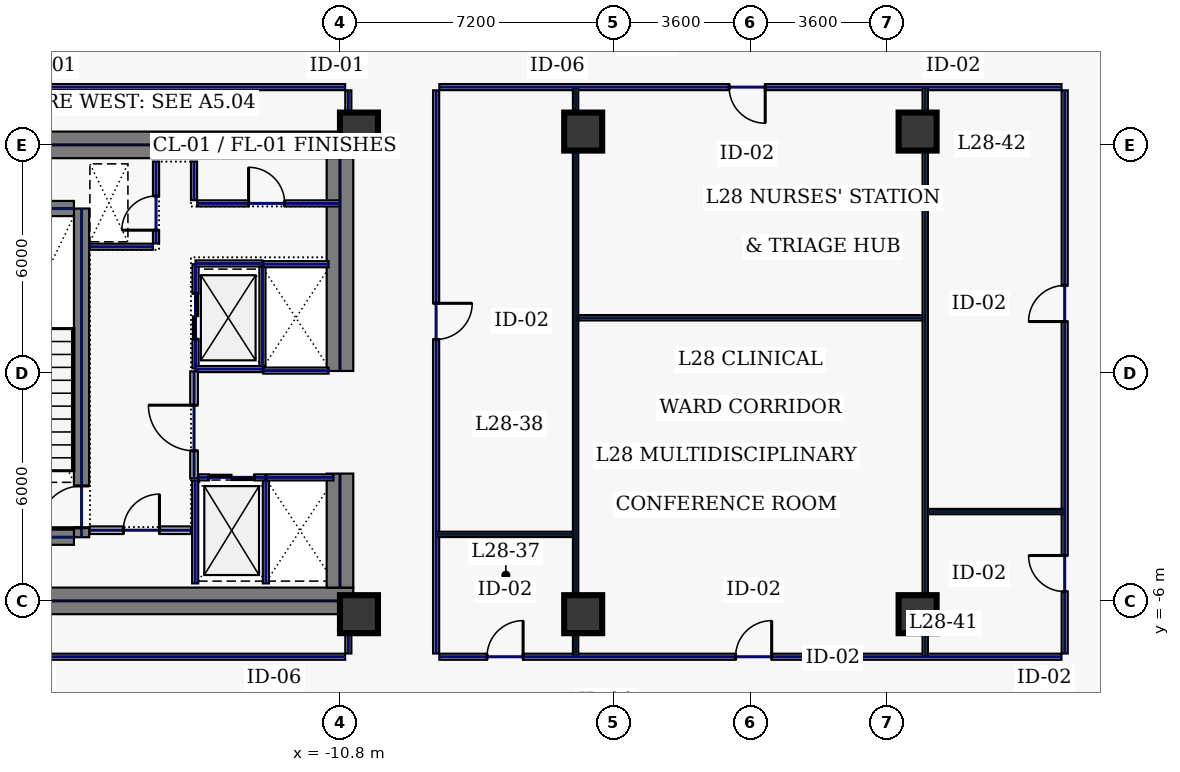
"""IFC4 building model, lengths in metres.
Left out: names, types, materials, properties, quantities, classifications, styles, units other than length and angle.
Written with IfcOpenShell. Run it as: python <this file> out.ifc"""

import sys

from ifc_helpers import new_model, si_unit, direction, frame, frame_2d, origin, origin_2d, place, context, subcontext, project, spatial, rectangle, hollow_rectangle, extrude, element, fill, save


model = new_model("IFC4")
c1 = context("Model", 3, precision=1e-05, world=origin(), true_north=direction((0.0, 1.0)))
c2 = subcontext(c1, "Body", "Model", "MODEL_VIEW")
j1 = project(units=[si_unit("LENGTHUNIT", "METRE"), si_unit("PLANEANGLEUNIT", "RADIAN")], contexts=[c1])
p1 = place(None, origin())
s1 = spatial("IfcSite", under=j1, at=p1, CompositionType="ELEMENT")
p2 = place(p1, origin())
s2 = spatial("IfcBuilding", under=s1, at=p2, CompositionType="ELEMENT")
p3 = place(p2, frame((0.0, 0.0, 125.4)))
s3 = spatial("IfcBuildingStorey", under=s2, at=p3, CompositionType="ELEMENT", Elevation=125.4)
for number, where, z_axis, x_axis in (
    (1, (-22.0, 6.0, 0.0), (0.0, 0.0, 1.0), (1.0, 0.0, 0.0)),
    (2, (-22.0, -6.0, 0.0), (0.0, 0.0, 1.0), (1.0, 0.0, 0.0)),
):
    element("IfcWall", number, at=place(p3, frame(where, z_axis=z_axis, x_axis=x_axis)), inside=s3, PredefinedType="SHEAR", context=c2, shape_type="SweptSolid", body=[
        extrude(rectangle(XDim=11.55, YDim=0.7, at=frame_2d((5.775, 0.0))), origin(), (0.0, 0.0, 1.0), 3.74),
    ])
p4 = place(p3, frame((-10.8, -5.65, 0.0), z_axis=(0.0, 0.0, 1.0), x_axis=(0.0, 1.0, 0.0)))
e3 = element("IfcWall", 3, at=p4, inside=s3, PredefinedType="SHEAR", context=c2, shape_type="SweptSolid", body=[
    extrude(rectangle(XDim=3.0, YDim=0.7, at=frame_2d((1.5, 0.0))), origin(), (0.0, 0.0, 1.0), 3.74),
])
p5 = place(p3, frame((-10.8, 0.05, 0.0), z_axis=(0.0, 0.0, 1.0), x_axis=(0.0, 1.0, 0.0)))
e4 = element("IfcWall", 4, at=p5, inside=s3, PredefinedType="SHEAR", context=c2, shape_type="SweptSolid", body=[
    extrude(rectangle(XDim=5.6, YDim=0.7, at=frame_2d((2.8, 0.0))), origin(), (0.0, 0.0, 1.0), 3.74),
])
p6 = place(p3, frame((-17.6, -4.325, 0.0), z_axis=(0.0, 0.0, 1.0), x_axis=(0.0, 1.0, 0.0)))
e5 = element("IfcWall", 5, at=p6, inside=s3, PredefinedType="SHEAR", context=c2, shape_type="SweptSolid", body=[
    extrude(rectangle(XDim=8.65, YDim=0.4, at=frame_2d((4.325, 0.0))), origin(), (0.0, 0.0, 1.0), 3.74),
])
p7 = place(p6, frame((0.25, 0.0, 0.0)))
e6 = element("IfcOpeningElement", 6, at=p7, cuts=e5, PredefinedType="OPENING", context=c2, shape_type="SweptSolid", body=[
    extrude(rectangle(XDim=1.1, YDim=2.2, at=frame_2d((0.55, 1.1))), frame((0.0, 0.21, 0.0), z_axis=(0.0, -1.0, 0.0), x_axis=(1.0, 0.0, 0.0)), (0.0, 0.0, 1.0), 0.42),
])
for number, where, z_axis, x_axis in (
    (7, (-21.2, -4.325, 0.0), (0.0, 0.0, 1.0), (1.0, 0.0, 0.0)),
    (8, (-21.2, 4.325, 0.0), (0.0, 0.0, 1.0), (1.0, 0.0, 0.0)),
):
    element("IfcWall", number, at=place(p3, frame(where, z_axis=z_axis, x_axis=x_axis)), inside=s3, PredefinedType="SHEAR", context=c2, shape_type="SweptSolid", body=[
        extrude(rectangle(XDim=3.4, YDim=0.4, at=frame_2d((1.7, 0.0))), origin(), (0.0, 0.0, 1.0), 3.74),
    ])
for number, where, z_axis, x_axis in (
    (9, (-10.3, -6.35, 0.0), (0.0, 0.0, 1.0), (1.0, 0.0, 0.0)),
    (10, (-10.3, 6.35, 0.0), (0.0, 0.0, 1.0), (1.0, 0.0, 0.0)),
    (11, (-4.4, -6.35, 0.0), (0.0, 0.0, 1.0), (1.0, 0.0, 0.0)),
    (12, (4.4, -6.35, 0.0), (0.0, 0.0, 1.0), (1.0, 0.0, 0.0)),
    (13, (-4.4, 6.35, 0.0), (0.0, 0.0, 1.0), (1.0, 0.0, 0.0)),
    (14, (4.4, 6.35, 0.0), (0.0, 0.0, 1.0), (1.0, 0.0, 0.0)),
):
    element("IfcColumn", number, at=place(p3, frame(where, z_axis=z_axis, x_axis=x_axis)), inside=s3, PredefinedType="COLUMN", context=c2, shape_type="SweptSolid", body=[
        extrude(hollow_rectangle(XDim=1.0, YDim=1.0, WallThickness=0.045, at=origin_2d()), origin(), (0.0, 0.0, 1.0), 3.74),
    ])
p8 = place(p3, frame((-14.6, 0.12, 0.0), z_axis=(0.0, 0.0, 1.0), x_axis=(0.0, 1.0, 0.0)))
e15 = element("IfcWall", 15, at=p8, inside=s3, PredefinedType="PARTITIONING", context=c2, shape_type="SweptSolid", body=[
    extrude(rectangle(XDim=2.74, YDim=0.16, at=frame_2d((1.37, 0.0))), origin(), (0.0, 0.0, 1.0), 3.74),
])
p9 = place(p8, frame((0.77, 0.0, 0.0)))
e16 = element("IfcOpeningElement", 16, at=p9, cuts=e15, PredefinedType="OPENING", context=c2, shape_type="SweptSolid", body=[
    extrude(rectangle(XDim=1.2, YDim=2.2, at=frame_2d((0.6, 1.1))), frame((0.0, 0.09, 0.0), z_axis=(0.0, -1.0, 0.0), x_axis=(1.0, 0.0, 0.0)), (0.0, 0.0, 1.0), 0.18),
])
for number, where, z_axis, x_axis in (
    (17, (-14.6, 0.1, 0.0), (0.0, 0.0, 1.0), (1.0, 0.0, 0.0)),
    (18, (-14.6, 2.88, 0.0), (0.0, 0.0, 1.0), (1.0, 0.0, 0.0)),
):
    element("IfcWall", number, at=place(p3, frame(where, z_axis=z_axis, x_axis=x_axis)), inside=s3, PredefinedType="PARTITIONING", context=c2, shape_type="SweptSolid", body=[
        extrude(rectangle(XDim=1.76, YDim=0.16, at=frame_2d((0.88, 0.0))), origin(), (0.0, 0.0, 1.0), 3.74),
    ])
p10 = place(p3, frame((-12.84, 0.18, 0.0), z_axis=(0.0, 0.0, 1.0), x_axis=(0.0, 1.0, 0.0)))
e19 = element("IfcWall", 19, at=p10, inside=s3, PredefinedType="PARTITIONING", context=c2, shape_type="SweptSolid", body=[
    extrude(rectangle(XDim=2.62, YDim=0.16, at=frame_2d((1.31, 0.0))), origin(), (0.0, 0.0, 1.0), 3.74),
])
p11 = place(p3, frame((-14.53, -2.75, 0.0), z_axis=(0.0, 0.0, 1.0), x_axis=(1.0, 0.0, 0.0)))
e20 = element("IfcWall", 20, at=p11, inside=s3, PredefinedType="PARTITIONING", context=c2, shape_type="SweptSolid", body=[
    extrude(rectangle(XDim=1.76, YDim=0.16, at=frame_2d((0.88, 0.0))), origin(), (0.0, 0.0, 1.0), 3.74),
])
p12 = place(p11, frame((0.28, 0.0, 0.0)))
e21 = element("IfcOpeningElement", 21, at=p12, cuts=e20, PredefinedType="OPENING", context=c2, shape_type="SweptSolid", body=[
    extrude(rectangle(XDim=1.2, YDim=2.2, at=frame_2d((0.6, 1.1))), frame((0.0, 0.09, 0.0), z_axis=(0.0, -1.0, 0.0), x_axis=(1.0, 0.0, 0.0)), (0.0, 0.0, 1.0), 0.18),
])
for number, where, z_axis, x_axis in (
    (22, (-12.75, -5.54, 0.0), (0.0, 0.0, 1.0), (0.0, 1.0, 0.0)),
    (23, (-14.61, -5.54, 0.0), (0.0, 0.0, 1.0), (0.0, 1.0, 0.0)),
):
    element("IfcWall", number, at=place(p3, frame(where, z_axis=z_axis, x_axis=x_axis)), inside=s3, PredefinedType="PARTITIONING", context=c2, shape_type="SweptSolid", body=[
        extrude(rectangle(XDim=2.7, YDim=0.16, at=frame_2d((1.35, 0.0))), origin(), (0.0, 0.0, 1.0), 3.74),
    ])
p13 = place(p3, frame((-12.73, -2.75, 0.0), z_axis=(0.0, 0.0, 1.0), x_axis=(1.0, 0.0, 0.0)))
e24 = element("IfcWall", 24, at=p13, inside=s3, PredefinedType="PARTITIONING", context=c2, shape_type="SweptSolid", body=[
    extrude(rectangle(XDim=1.76, YDim=0.16, at=frame_2d((0.88, 0.0))), origin(), (0.0, 0.0, 1.0), 3.74),
])
for number, where, z_axis, x_axis in (
    (25, (-12.82, 0.06, 0.0), (0.0, 0.0, 1.0), (1.0, 0.0, 0.0)),
    (26, (-12.82, 2.86, 0.0), (0.0, 0.0, 1.0), (1.0, 0.0, 0.0)),
):
    element("IfcWall", number, at=place(p3, frame(where, z_axis=z_axis, x_axis=x_axis)), inside=s3, PredefinedType="PARTITIONING", context=c2, shape_type="SweptSolid", body=[
        extrude(rectangle(XDim=1.72, YDim=0.16, at=frame_2d((0.86, 0.0))), origin(), (0.0, 0.0, 1.0), 3.74),
    ])
p14 = place(p3, frame((-15.64, 3.405, 0.0), z_axis=(0.0, 0.0, 1.0), x_axis=(0.0, 1.0, 0.0)))
e27 = element("IfcWall", 27, at=p14, inside=s3, PredefinedType="PARTITIONING", context=c2, shape_type="SweptSolid", body=[
    extrude(rectangle(XDim=2.155, YDim=0.16, at=frame_2d((1.078, 0.0))), origin(), (0.0, 0.0, 1.0), 3.74),
])
p15 = place(p14, frame((0.35, 0.0, 0.0)))
e28 = element("IfcOpeningElement", 28, at=p15, cuts=e27, PredefinedType="OPENING", context=c2, shape_type="SweptSolid", body=[
    extrude(rectangle(XDim=0.9, YDim=2.2, at=frame_2d((0.45, 1.1))), frame((0.0, 0.09, 0.0), z_axis=(0.0, -1.0, 0.0), x_axis=(1.0, 0.0, 0.0)), (0.0, 0.0, 1.0), 0.18),
])
p16 = place(p3, frame((-17.38, 3.32, 0.0), z_axis=(0.0, 0.0, 1.0), x_axis=(1.0, 0.0, 0.0)))
e29 = element("IfcWall", 29, at=p16, inside=s3, PredefinedType="PARTITIONING", context=c2, shape_type="SweptSolid", body=[
    extrude(rectangle(XDim=1.655, YDim=0.16, at=frame_2d((0.827, 0.0))), origin(), (0.0, 0.0, 1.0), 3.74),
])
p17 = place(p3, frame((-17.38, -4.14, 0.0), z_axis=(0.0, 0.0, 1.0), x_axis=(1.0, 0.0, 0.0)))
e30 = element("IfcWall", 30, at=p17, inside=s3, PredefinedType="SOLIDWALL", context=c2, shape_type="SweptSolid", body=[
    extrude(rectangle(XDim=2.66, YDim=0.2, at=frame_2d((1.33, 0.0))), origin(), (0.0, 0.0, 1.0), 3.74),
])
p18 = place(p17, frame((0.88, 0.0, 0.0)))
e31 = element("IfcOpeningElement", 31, at=p18, cuts=e30, PredefinedType="OPENING", context=c2, shape_type="SweptSolid", body=[
    extrude(rectangle(XDim=0.95, YDim=2.2, at=frame_2d((0.475, 1.1))), frame((0.0, 0.11, 0.0), z_axis=(0.0, -1.0, 0.0), x_axis=(1.0, 0.0, 0.0)), (0.0, 0.0, 1.0), 0.22),
])
p19 = place(p3, frame((-14.555, 4.46, 0.0), z_axis=(0.0, 0.0, 1.0), x_axis=(1.0, 0.0, 0.0)))
e32 = element("IfcWall", 32, at=p19, inside=s3, PredefinedType="PARTITIONING", context=c2, shape_type="SweptSolid", body=[
    extrude(rectangle(XDim=3.755, YDim=0.16, at=frame_2d((1.877, 0.0))), origin(), (0.0, 0.0, 1.0), 3.74),
])
p20 = place(p19, frame((1.35, 0.0, 0.0)))
e33 = element("IfcOpeningElement", 33, at=p20, cuts=e32, PredefinedType="OPENING", context=c2, shape_type="SweptSolid", body=[
    extrude(rectangle(XDim=0.95, YDim=2.2, at=frame_2d((0.475, 1.1))), frame((0.0, 0.09, 0.0), z_axis=(0.0, -1.0, 0.0), x_axis=(1.0, 0.0, 0.0)), (0.0, 0.0, 1.0), 0.18),
])
p21 = place(p3, frame((-14.64, 4.545, 0.0), z_axis=(0.0, 0.0, 1.0), x_axis=(0.0, 1.0, 0.0)))
e34 = element("IfcWall", 34, at=p21, inside=s3, PredefinedType="PARTITIONING", context=c2, shape_type="SweptSolid", body=[
    extrude(rectangle(XDim=1.015, YDim=0.16, at=frame_2d((0.508, 0.0))), origin(), (0.0, 0.0, 1.0), 3.74),
])
p22 = place(p3, frame((-14.64, -2.78, 0.0), z_axis=(0.0, 0.0, 1.0), x_axis=(0.0, 1.0, 0.0)))
e35 = element("IfcWall", 35, at=p22, inside=s3, PredefinedType="SOLIDWALL", context=c2, shape_type="SweptSolid", body=[
    extrude(rectangle(XDim=2.82, YDim=0.2, at=frame_2d((1.41, 0.0))), origin(), (0.0, 0.0, 1.0), 3.74),
])
p23 = place(p22, frame((0.73, 0.0, 0.0)))
e36 = element("IfcOpeningElement", 36, at=p23, cuts=e35, PredefinedType="OPENING", context=c2, shape_type="SweptSolid", body=[
    extrude(rectangle(XDim=1.2, YDim=2.2, at=frame_2d((0.6, 1.1))), frame((0.0, 0.11, 0.0), z_axis=(0.0, -1.0, 0.0), x_axis=(1.0, 0.0, 0.0)), (0.0, 0.0, 1.0), 0.22),
])
p24 = place(p3, frame((8.27, -7.385, 0.0), z_axis=(0.0, 0.0, 1.0), x_axis=(0.0, 1.0, 0.0)))
e37 = element("IfcWall", 37, at=p24, inside=s3, PredefinedType="PARTITIONING", context=c2, shape_type="SweptSolid", body=[
    extrude(rectangle(XDim=14.82, YDim=0.16, at=frame_2d((7.41, 0.0))), origin(), (0.0, 0.0, 1.0), 3.74),
])
p25 = place(p24, frame((1.629, 0.0, 0.0)))
e38 = element("IfcOpeningElement", 38, at=p25, cuts=e37, PredefinedType="OPENING", context=c2, shape_type="SweptSolid", body=[
    extrude(rectangle(XDim=0.95, YDim=2.2, at=frame_2d((0.475, 1.1))), frame((0.0, 0.09, 0.0), z_axis=(0.0, -1.0, 0.0), x_axis=(1.0, 0.0, 0.0)), (0.0, 0.0, 1.0), 0.18),
])
p26 = place(p24, frame((8.736, 0.0, 0.0)))
e39 = element("IfcOpeningElement", 39, at=p26, cuts=e37, PredefinedType="OPENING", context=c2, shape_type="SweptSolid", body=[
    extrude(rectangle(XDim=0.95, YDim=2.2, at=frame_2d((0.475, 1.1))), frame((0.0, 0.09, 0.0), z_axis=(0.0, -1.0, 0.0), x_axis=(1.0, 0.0, 0.0)), (0.0, 0.0, 1.0), 0.18),
])
p27 = place(p3, frame((8.185, 7.52, 0.0), z_axis=(0.0, 0.0, 1.0), x_axis=(-1.0, 0.0, 0.0)))
e40 = element("IfcWall", 40, at=p27, inside=s3, PredefinedType="PARTITIONING", context=c2, shape_type="SweptSolid", body=[
    extrude(rectangle(XDim=16.37, YDim=0.16, at=frame_2d((8.185, 0.0))), origin(), (0.0, 0.0, 1.0), 3.74),
])
p28 = place(p27, frame((7.795, 0.0, 0.0)))
e41 = element("IfcOpeningElement", 41, at=p28, cuts=e40, PredefinedType="OPENING", context=c2, shape_type="SweptSolid", body=[
    extrude(rectangle(XDim=0.95, YDim=2.2, at=frame_2d((0.475, 1.1))), frame((0.0, 0.09, 0.0), z_axis=(0.0, -1.0, 0.0), x_axis=(1.0, 0.0, 0.0)), (0.0, 0.0, 1.0), 0.18),
])
p29 = place(p3, frame((-8.27, 7.435, 0.0), z_axis=(0.0, 0.0, 1.0), x_axis=(0.0, -1.0, 0.0)))
e42 = element("IfcWall", 42, at=p29, inside=s3, PredefinedType="PARTITIONING", context=c2, shape_type="SweptSolid", body=[
    extrude(rectangle(XDim=14.82, YDim=0.16, at=frame_2d((7.41, 0.0))), origin(), (0.0, 0.0, 1.0), 3.74),
])
p30 = place(p29, frame((5.604, 0.0, 0.0)))
e43 = element("IfcOpeningElement", 43, at=p30, cuts=e42, PredefinedType="OPENING", context=c2, shape_type="SweptSolid", body=[
    extrude(rectangle(XDim=0.95, YDim=2.2, at=frame_2d((0.475, 1.1))), frame((0.0, 0.09, 0.0), z_axis=(0.0, -1.0, 0.0), x_axis=(1.0, 0.0, 0.0)), (0.0, 0.0, 1.0), 0.18),
])
p31 = place(p3, frame((-8.185, -7.47, 0.0), z_axis=(0.0, 0.0, 1.0), x_axis=(1.0, 0.0, 0.0)))
e44 = element("IfcWall", 44, at=p31, inside=s3, PredefinedType="PARTITIONING", context=c2, shape_type="SweptSolid", body=[
    extrude(rectangle(XDim=16.37, YDim=0.16, at=frame_2d((8.185, 0.0))), origin(), (0.0, 0.0, 1.0), 3.74),
])
p32 = place(p31, frame((1.254, 0.0, 0.0)))
e45 = element("IfcOpeningElement", 45, at=p32, cuts=e44, PredefinedType="OPENING", context=c2, shape_type="SweptSolid", body=[
    extrude(rectangle(XDim=0.95, YDim=2.2, at=frame_2d((0.475, 1.1))), frame((0.0, 0.09, 0.0), z_axis=(0.0, -1.0, 0.0), x_axis=(1.0, 0.0, 0.0)), (0.0, 0.0, 1.0), 0.18),
])
p33 = place(p31, frame((7.795, 0.0, 0.0)))
e46 = element("IfcOpeningElement", 46, at=p33, cuts=e44, PredefinedType="OPENING", context=c2, shape_type="SweptSolid", body=[
    extrude(rectangle(XDim=0.95, YDim=2.2, at=frame_2d((0.475, 1.1))), frame((0.0, 0.09, 0.0), z_axis=(0.0, -1.0, 0.0), x_axis=(1.0, 0.0, 0.0)), (0.0, 0.0, 1.0), 0.18),
])
p34 = place(p3, frame((-10.58, -7.385, 0.0), z_axis=(0.0, 0.0, 1.0), x_axis=(0.0, 1.0, 0.0)))
e47 = element("IfcWall", 47, at=p34, inside=s3, PredefinedType="PARTITIONING", context=c2, shape_type="SweptSolid", body=[
    extrude(rectangle(XDim=0.965, YDim=0.16, at=frame_2d((0.482, 0.0))), origin(), (0.0, 0.0, 1.0), 3.74),
])
p35 = place(p3, frame((-10.58, 6.42, 0.0), z_axis=(0.0, 0.0, 1.0), x_axis=(0.0, 1.0, 0.0)))
e48 = element("IfcWall", 48, at=p35, inside=s3, PredefinedType="PARTITIONING", context=c2, shape_type="SweptSolid", body=[
    extrude(rectangle(XDim=1.015, YDim=0.16, at=frame_2d((0.508, 0.0))), origin(), (0.0, 0.0, 1.0), 3.74),
])
for number, where, z_axis, x_axis in (
    (49, (-10.665, 7.52, 0.0), (0.0, 0.0, 1.0), (-1.0, 0.0, 0.0)),
    (50, (-25.235, -7.47, 0.0), (0.0, 0.0, 1.0), (1.0, 0.0, 0.0)),
):
    element("IfcWall", number, at=place(p3, frame(where, z_axis=z_axis, x_axis=x_axis)), inside=s3, PredefinedType="PARTITIONING", context=c2, shape_type="SweptSolid", body=[
        extrude(rectangle(XDim=14.57, YDim=0.16, at=frame_2d((7.285, 0.0))), origin(), (0.0, 0.0, 1.0), 3.74),
    ])
for number, where, z_axis, x_axis in (
    (51, (-4.6, -7.465, 0.0), (0.0, 0.0, 1.0), (0.0, 1.0, 0.0)),
    (52, (4.6, -7.465, 0.0), (0.0, 0.0, 1.0), (0.0, 1.0, 0.0)),
):
    element("IfcWall", number, at=place(p3, frame(where, z_axis=z_axis, x_axis=x_axis)), inside=s3, PredefinedType="PARTITIONING", context=c2, shape_type="SweptSolid", body=[
        extrude(rectangle(XDim=14.98, YDim=0.14, at=frame_2d((7.49, 0.0))), origin(), (0.0, 0.0, 1.0), 2.935),
    ])
p36 = place(p3, frame((-4.525, 1.45, 0.0), z_axis=(0.0, 0.0, 1.0), x_axis=(1.0, 0.0, 0.0)))
e53 = element("IfcWall", 53, at=p36, inside=s3, PredefinedType="PARTITIONING", context=c2, shape_type="SweptSolid", body=[
    extrude(rectangle(XDim=9.05, YDim=0.14, at=frame_2d((4.525, 0.0))), origin(), (0.0, 0.0, 1.0), 3.74),
])
for number, where, z_axis, x_axis in (
    (54, (-8.265, -4.25, 0.0), (0.0, 0.0, 1.0), (1.0, 0.0, 0.0)),
    (55, (4.675, -3.65, 0.0), (0.0, 0.0, 1.0), (1.0, 0.0, 0.0)),
):
    element("IfcWall", number, at=place(p3, frame(where, z_axis=z_axis, x_axis=x_axis)), inside=s3, PredefinedType="PARTITIONING", context=c2, shape_type="SweptSolid", body=[
        extrude(rectangle(XDim=3.59, YDim=0.14, at=frame_2d((1.795, 0.0))), origin(), (0.0, 0.0, 1.0), 3.74),
    ])
p37 = place(p7, origin())
e56 = element("IfcDoor", 56, at=p37, inside=s3, OperationType="SINGLE_SWING_LEFT", PredefinedType="DOOR", context=c2, shape_type="SweptSolid", body=[
    extrude(rectangle(XDim=1.1, YDim=2.2, at=frame_2d((0.55, 1.1))), frame((0.0, 0.025, 0.0), z_axis=(0.0, -1.0, 0.0), x_axis=(1.0, 0.0, 0.0)), (0.0, 0.0, 1.0), 0.05),
])
fill(e6, e56)
p38 = place(p9, origin())
e57 = element("IfcDoor", 57, at=p38, inside=s3, OperationType="SLIDING_TO_LEFT", PredefinedType="DOOR", context=c2, shape_type="SweptSolid", body=[
    extrude(rectangle(XDim=1.2, YDim=2.2, at=frame_2d((0.6, 1.1))), frame((0.0, 0.025, 0.0), z_axis=(0.0, -1.0, 0.0), x_axis=(1.0, 0.0, 0.0)), (0.0, 0.0, 1.0), 0.05),
])
fill(e16, e57)
p39 = place(p12, origin())
e58 = element("IfcDoor", 58, at=p39, inside=s3, OperationType="SLIDING_TO_LEFT", PredefinedType="DOOR", context=c2, shape_type="SweptSolid", body=[
    extrude(rectangle(XDim=1.2, YDim=2.2, at=frame_2d((0.6, 1.1))), frame((0.0, 0.025, 0.0), z_axis=(0.0, -1.0, 0.0), x_axis=(1.0, 0.0, 0.0)), (0.0, 0.0, 1.0), 0.05),
])
fill(e21, e58)
p40 = place(p15, origin())
e59 = element("IfcDoor", 59, at=p40, inside=s3, OperationType="SINGLE_SWING_LEFT", PredefinedType="DOOR", context=c2, shape_type="SweptSolid", body=[
    extrude(rectangle(XDim=0.9, YDim=2.2, at=frame_2d((0.45, 1.1))), frame((0.0, 0.025, 0.0), z_axis=(0.0, -1.0, 0.0), x_axis=(1.0, 0.0, 0.0)), (0.0, 0.0, 1.0), 0.05),
])
fill(e28, e59)
p41 = place(p18, origin())
e60 = element("IfcDoor", 60, at=p41, inside=s3, OperationType="SINGLE_SWING_RIGHT", PredefinedType="DOOR", context=c2, shape_type="SweptSolid", body=[
    extrude(rectangle(XDim=0.95, YDim=2.2, at=frame_2d((0.475, 1.1))), frame((0.0, 0.025, 0.0), z_axis=(0.0, -1.0, 0.0), x_axis=(1.0, 0.0, 0.0)), (0.0, 0.0, 1.0), 0.05),
])
fill(e31, e60)
p42 = place(p20, origin())
e61 = element("IfcDoor", 61, at=p42, inside=s3, OperationType="SINGLE_SWING_LEFT", PredefinedType="DOOR", context=c2, shape_type="SweptSolid", body=[
    extrude(rectangle(XDim=0.95, YDim=2.2, at=frame_2d((0.475, 1.1))), frame((0.0, 0.025, 0.0), z_axis=(0.0, -1.0, 0.0), x_axis=(1.0, 0.0, 0.0)), (0.0, 0.0, 1.0), 0.05),
])
fill(e33, e61)
p43 = place(p23, origin())
e62 = element("IfcDoor", 62, at=p43, inside=s3, OperationType="SINGLE_SWING_RIGHT", PredefinedType="DOOR", context=c2, shape_type="SweptSolid", body=[
    extrude(rectangle(XDim=1.2, YDim=2.2, at=frame_2d((0.6, 1.1))), frame((0.0, 0.025, 0.0), z_axis=(0.0, -1.0, 0.0), x_axis=(1.0, 0.0, 0.0)), (0.0, 0.0, 1.0), 0.05),
])
fill(e36, e62)
p44 = place(p32, origin())
e63 = element("IfcDoor", 63, at=p44, inside=s3, OperationType="SINGLE_SWING_RIGHT", PredefinedType="DOOR", context=c2, shape_type="SweptSolid", body=[
    extrude(rectangle(XDim=0.95, YDim=2.2, at=frame_2d((0.475, 1.1))), frame((0.0, 0.025, 0.0), z_axis=(0.0, -1.0, 0.0), x_axis=(1.0, 0.0, 0.0)), (0.0, 0.0, 1.0), 0.05),
])
fill(e45, e63)
p45 = place(p30, origin())
e64 = element("IfcDoor", 64, at=p45, inside=s3, OperationType="SINGLE_SWING_LEFT", PredefinedType="DOOR", context=c2, shape_type="SweptSolid", body=[
    extrude(rectangle(XDim=0.95, YDim=2.2, at=frame_2d((0.475, 1.1))), frame((0.0, 0.025, 0.0), z_axis=(0.0, -1.0, 0.0), x_axis=(1.0, 0.0, 0.0)), (0.0, 0.0, 1.0), 0.05),
])
fill(e43, e64)
p46 = place(p33, origin())
e65 = element("IfcDoor", 65, at=p46, inside=s3, OperationType="SINGLE_SWING_RIGHT", PredefinedType="DOOR", context=c2, shape_type="SweptSolid", body=[
    extrude(rectangle(XDim=0.95, YDim=2.2, at=frame_2d((0.475, 1.1))), frame((0.0, 0.025, 0.0), z_axis=(0.0, -1.0, 0.0), x_axis=(1.0, 0.0, 0.0)), (0.0, 0.0, 1.0), 0.05),
])
fill(e46, e65)
p47 = place(p28, origin())
e66 = element("IfcDoor", 66, at=p47, inside=s3, OperationType="SINGLE_SWING_LEFT", PredefinedType="DOOR", context=c2, shape_type="SweptSolid", body=[
    extrude(rectangle(XDim=0.95, YDim=2.2, at=frame_2d((0.475, 1.1))), frame((0.0, 0.025, 0.0), z_axis=(0.0, -1.0, 0.0), x_axis=(1.0, 0.0, 0.0)), (0.0, 0.0, 1.0), 0.05),
])
fill(e41, e66)
p48 = place(p25, origin())
e67 = element("IfcDoor", 67, at=p48, inside=s3, OperationType="SINGLE_SWING_RIGHT", PredefinedType="DOOR", context=c2, shape_type="SweptSolid", body=[
    extrude(rectangle(XDim=0.95, YDim=2.2, at=frame_2d((0.475, 1.1))), frame((0.0, 0.025, 0.0), z_axis=(0.0, -1.0, 0.0), x_axis=(1.0, 0.0, 0.0)), (0.0, 0.0, 1.0), 0.05),
])
fill(e38, e67)
p49 = place(p26, origin())
e68 = element("IfcDoor", 68, at=p49, inside=s3, OperationType="SINGLE_SWING_LEFT", PredefinedType="DOOR", context=c2, shape_type="SweptSolid", body=[
    extrude(rectangle(XDim=0.95, YDim=2.2, at=frame_2d((0.475, 1.1))), frame((0.0, 0.025, 0.0), z_axis=(0.0, -1.0, 0.0), x_axis=(1.0, 0.0, 0.0)), (0.0, 0.0, 1.0), 0.05),
])
fill(e39, e68)
save(model, sys.argv[1])
